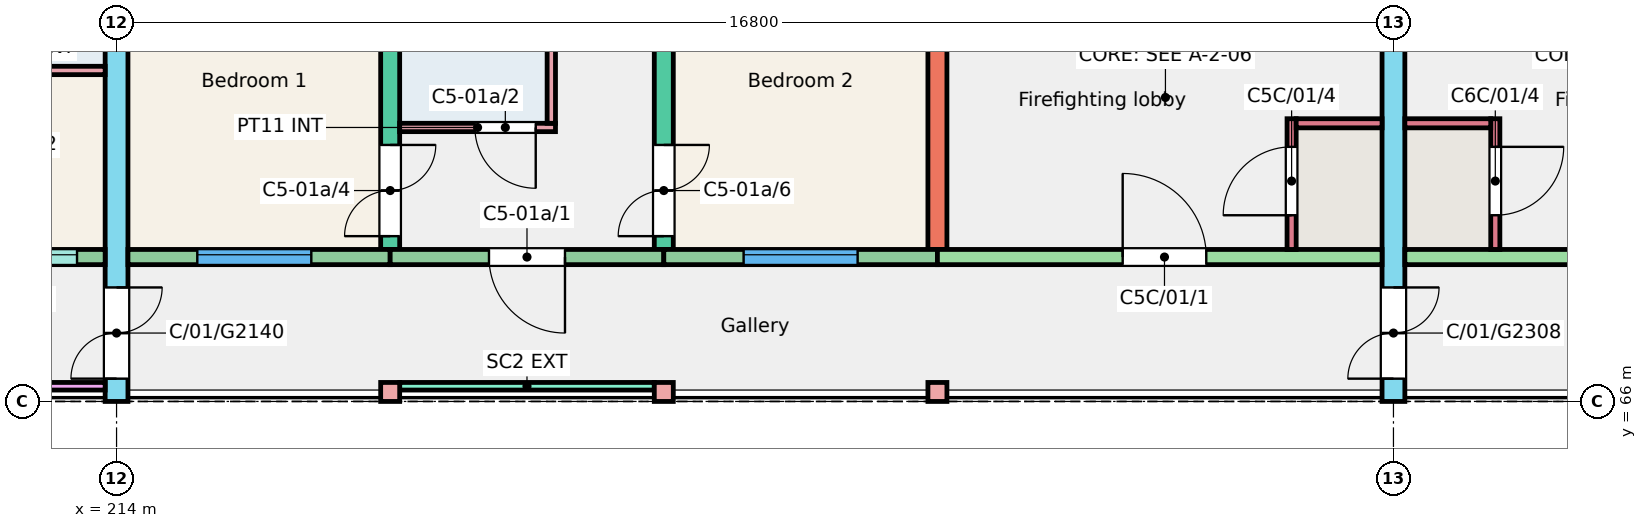
"""IFC4 building model, lengths in metres.
Left out: names, types, materials, properties, quantities, classifications, styles, units other than length and angle.
Written with IfcOpenShell. Run it as: python <this file> out.ifc"""

import sys

from ifc_helpers import new_model, si_unit, direction, frame, frame_2d, origin, origin_2d, place, context, subcontext, project, spatial, rectangle, extrude, element, fill, save


model = new_model("IFC4")
c1 = context("Model", 3, precision=1e-05, world=origin(), true_north=direction((0.0, 1.0)))
c2 = subcontext(c1, "Body", "Model", "MODEL_VIEW")
j1 = project(units=[si_unit("LENGTHUNIT", "METRE"), si_unit("PLANEANGLEUNIT", "RADIAN")], contexts=[c1])
p1 = place(None, origin())
s1 = spatial("IfcSite", under=j1, at=p1, CompositionType="ELEMENT")
p2 = place(p1, origin())
s2 = spatial("IfcBuilding", under=s1, at=p2, CompositionType="ELEMENT")
p3 = place(p2, frame((0.0, 0.0, 3.0)))
s3 = spatial("IfcBuildingStorey", under=s2, at=p3, CompositionType="ELEMENT", Elevation=3.0)
p4 = place(p3, frame((214.0, 66.0, 0.0), z_axis=(0.0, 0.0, 1.0), x_axis=(0.0, 1.0, 0.0)))
e1 = element("IfcWall", 1, at=p4, inside=s3, PredefinedType="SHEAR", context=c2, shape_type="SweptSolid", body=[
    extrude(rectangle(XDim=11.0, YDim=0.3, at=frame_2d((5.5, 0.0))), origin(), (0.0, 0.0, 1.0), 3.0),
])
p5 = place(p4, frame((0.3, 0.0, 0.0)))
e2 = element("IfcOpeningElement", 2, at=p5, cuts=e1, PredefinedType="OPENING", context=c2, shape_type="SweptSolid", body=[
    extrude(rectangle(XDim=1.2, YDim=2.1, at=frame_2d((0.6, 1.05))), frame((0.0, 0.16, 0.0), z_axis=(0.0, -1.0, 0.0), x_axis=(1.0, 0.0, 0.0)), (0.0, 0.0, 1.0), 0.32),
])
p6 = place(p3, frame((217.6, 68.0, 0.0), z_axis=(0.0, 0.0, 1.0), x_axis=(0.0, 1.0, 0.0)))
e3 = element("IfcWall", 3, at=p6, inside=s3, PredefinedType="SHEAR", context=c2, shape_type="SweptSolid", body=[
    extrude(rectangle(XDim=9.0, YDim=0.25, at=frame_2d((4.5, 0.0))), origin(), (0.0, 0.0, 1.0), 3.0),
])
p7 = place(p6, frame((0.175, 0.0, 0.0)))
e4 = element("IfcOpeningElement", 4, at=p7, cuts=e3, PredefinedType="OPENING", context=c2, shape_type="SweptSolid", body=[
    extrude(rectangle(XDim=1.2, YDim=2.1, at=frame_2d((0.6, 1.05))), frame((0.0, 0.135, 0.0), z_axis=(0.0, -1.0, 0.0), x_axis=(1.0, 0.0, 0.0)), (0.0, 0.0, 1.0), 0.27),
])
p8 = place(p6, frame((6.4, 0.0, 0.0)))
e5 = element("IfcOpeningElement", 5, at=p8, cuts=e3, PredefinedType="OPENING", context=c2, shape_type="SweptSolid", body=[
    extrude(rectangle(XDim=1.2, YDim=2.1, at=frame_2d((0.6, 1.05))), frame((0.0, 0.135, 0.0), z_axis=(0.0, -1.0, 0.0), x_axis=(1.0, 0.0, 0.0)), (0.0, 0.0, 1.0), 0.27),
])
p9 = place(p3, frame((221.2, 68.0, 0.0), z_axis=(0.0, 0.0, 1.0), x_axis=(0.0, 1.0, 0.0)))
e6 = element("IfcWall", 6, at=p9, inside=s3, PredefinedType="SHEAR", context=c2, shape_type="SweptSolid", body=[
    extrude(rectangle(XDim=9.0, YDim=0.25, at=frame_2d((4.5, 0.0))), origin(), (0.0, 0.0, 1.0), 3.0),
])
p10 = place(p9, frame((0.175, 0.0, 0.0)))
e7 = element("IfcOpeningElement", 7, at=p10, cuts=e6, PredefinedType="OPENING", context=c2, shape_type="SweptSolid", body=[
    extrude(rectangle(XDim=1.2, YDim=2.1, at=frame_2d((0.6, 1.05))), frame((0.0, 0.135, 0.0), z_axis=(0.0, -1.0, 0.0), x_axis=(1.0, 0.0, 0.0)), (0.0, 0.0, 1.0), 0.27),
])
p11 = place(p9, frame((6.4, 0.0, 0.0)))
e8 = element("IfcOpeningElement", 8, at=p11, cuts=e6, PredefinedType="OPENING", context=c2, shape_type="SweptSolid", body=[
    extrude(rectangle(XDim=1.2, YDim=2.1, at=frame_2d((0.6, 1.05))), frame((0.0, 0.135, 0.0), z_axis=(0.0, -1.0, 0.0), x_axis=(1.0, 0.0, 0.0)), (0.0, 0.0, 1.0), 0.27),
])
p12 = place(p3, frame((224.8, 68.0, 0.0), z_axis=(0.0, 0.0, 1.0), x_axis=(0.0, 1.0, 0.0)))
e9 = element("IfcWall", 9, at=p12, inside=s3, PredefinedType="SHEAR", context=c2, shape_type="SweptSolid", body=[
    extrude(rectangle(XDim=9.0, YDim=0.25, at=frame_2d((4.5, 0.0))), origin(), (0.0, 0.0, 1.0), 3.0),
])
p13 = place(p3, frame((230.8, 66.0, 0.0), z_axis=(0.0, 0.0, 1.0), x_axis=(0.0, 1.0, 0.0)))
e10 = element("IfcWall", 10, at=p13, inside=s3, PredefinedType="SHEAR", context=c2, shape_type="SweptSolid", body=[
    extrude(rectangle(XDim=11.0, YDim=0.3, at=frame_2d((5.5, 0.0))), origin(), (0.0, 0.0, 1.0), 3.0),
])
p14 = place(p13, frame((0.3, 0.0, 0.0)))
e11 = element("IfcOpeningElement", 11, at=p14, cuts=e10, PredefinedType="OPENING", context=c2, shape_type="SweptSolid", body=[
    extrude(rectangle(XDim=1.2, YDim=2.1, at=frame_2d((0.6, 1.05))), frame((0.0, 0.16, 0.0), z_axis=(0.0, -1.0, 0.0), x_axis=(1.0, 0.0, 0.0)), (0.0, 0.0, 1.0), 0.32),
])
p15 = place(p3, frame((210.4, 67.9, 0.0), z_axis=(0.0, 0.0, 1.0), x_axis=(1.0, 0.0, 0.0)))
e12 = element("IfcWall", 12, at=p15, inside=s3, PredefinedType="SOLIDWALL", context=c2, shape_type="SweptSolid", body=[
    extrude(rectangle(XDim=3.45, YDim=0.2, at=frame_2d((1.725, 0.0))), origin(), (0.0, 0.0, 1.0), 3.0),
])
p16 = place(p15, frame((1.88, 0.0, 1.1)))
e13 = element("IfcOpeningElement", 13, at=p16, cuts=e12, PredefinedType="OPENING", context=c2, shape_type="SweptSolid", body=[
    extrude(rectangle(XDim=1.2, YDim=1.3, at=frame_2d((0.6, 0.65))), frame((0.0, 0.11, 0.0), z_axis=(0.0, -1.0, 0.0), x_axis=(1.0, 0.0, 0.0)), (0.0, 0.0, 1.0), 0.22),
])
p17 = place(p15, frame((0.25, 0.0, 0.0)))
e14 = element("IfcOpeningElement", 14, at=p17, cuts=e12, PredefinedType="OPENING", context=c2, shape_type="SweptSolid", body=[
    extrude(rectangle(XDim=1.0, YDim=2.1, at=frame_2d((0.5, 1.05))), frame((0.0, 0.11, 0.0), z_axis=(0.0, -1.0, 0.0), x_axis=(1.0, 0.0, 0.0)), (0.0, 0.0, 1.0), 0.22),
])
p18 = place(p3, frame((214.15, 67.9, 0.0), z_axis=(0.0, 0.0, 1.0), x_axis=(1.0, 0.0, 0.0)))
e15 = element("IfcWall", 15, at=p18, inside=s3, PredefinedType="SOLIDWALL", context=c2, shape_type="SweptSolid", body=[
    extrude(rectangle(XDim=3.45, YDim=0.2, at=frame_2d((1.725, 0.0))), origin(), (0.0, 0.0, 1.0), 3.0),
])
p19 = place(p18, frame((0.913, 0.0, 0.9)))
e16 = element("IfcOpeningElement", 16, at=p19, cuts=e15, PredefinedType="OPENING", context=c2, shape_type="SweptSolid", body=[
    extrude(rectangle(XDim=1.5, YDim=1.5, at=frame_2d((0.75, 0.75))), frame((0.0, 0.11, 0.0), z_axis=(0.0, -1.0, 0.0), x_axis=(1.0, 0.0, 0.0)), (0.0, 0.0, 1.0), 0.22),
])
p20 = place(p3, frame((217.6, 67.9, 0.0), z_axis=(0.0, 0.0, 1.0), x_axis=(1.0, 0.0, 0.0)))
e17 = element("IfcWall", 17, at=p20, inside=s3, PredefinedType="SOLIDWALL", context=c2, shape_type="SweptSolid", body=[
    extrude(rectangle(XDim=3.6, YDim=0.2, at=frame_2d((1.8, 0.0))), origin(), (0.0, 0.0, 1.0), 3.0),
])
p21 = place(p20, frame((1.3, 0.0, 0.0)))
e18 = element("IfcOpeningElement", 18, at=p21, cuts=e17, PredefinedType="OPENING", context=c2, shape_type="SweptSolid", body=[
    extrude(rectangle(XDim=1.0, YDim=2.1, at=frame_2d((0.5, 1.05))), frame((0.0, 0.11, 0.0), z_axis=(0.0, -1.0, 0.0), x_axis=(1.0, 0.0, 0.0)), (0.0, 0.0, 1.0), 0.22),
])
p22 = place(p3, frame((221.2, 67.9, 0.0), z_axis=(0.0, 0.0, 1.0), x_axis=(1.0, 0.0, 0.0)))
e19 = element("IfcWall", 19, at=p22, inside=s3, PredefinedType="SOLIDWALL", context=c2, shape_type="SweptSolid", body=[
    extrude(rectangle(XDim=3.6, YDim=0.2, at=frame_2d((1.8, 0.0))), origin(), (0.0, 0.0, 1.0), 3.0),
])
p23 = place(p22, frame((1.05, 0.0, 0.9)))
e20 = element("IfcOpeningElement", 20, at=p23, cuts=e19, PredefinedType="OPENING", context=c2, shape_type="SweptSolid", body=[
    extrude(rectangle(XDim=1.5, YDim=1.5, at=frame_2d((0.75, 0.75))), frame((0.0, 0.11, 0.0), z_axis=(0.0, -1.0, 0.0), x_axis=(1.0, 0.0, 0.0)), (0.0, 0.0, 1.0), 0.22),
])
p24 = place(p3, frame((224.8, 67.9, 0.0), z_axis=(0.0, 0.0, 1.0), x_axis=(1.0, 0.0, 0.0)))
e21 = element("IfcWall", 21, at=p24, inside=s3, PredefinedType="SHEAR", context=c2, shape_type="SweptSolid", body=[
    extrude(rectangle(XDim=5.85, YDim=0.2, at=frame_2d((2.925, 0.0))), origin(), (0.0, 0.0, 1.0), 3.0),
])
p25 = place(p24, frame((2.438, 0.0, 0.0)))
e22 = element("IfcOpeningElement", 22, at=p25, cuts=e21, PredefinedType="OPENING", context=c2, shape_type="SweptSolid", body=[
    extrude(rectangle(XDim=1.1, YDim=2.1, at=frame_2d((0.55, 1.05))), frame((0.0, 0.11, 0.0), z_axis=(0.0, -1.0, 0.0), x_axis=(1.0, 0.0, 0.0)), (0.0, 0.0, 1.0), 0.22),
])
p26 = place(p3, frame((229.46, 68.0, 0.0), z_axis=(0.0, 0.0, 1.0), x_axis=(0.0, 1.0, 0.0)))
e23 = element("IfcWall", 23, at=p26, inside=s3, PredefinedType="SHEAR", context=c2, shape_type="SweptSolid", body=[
    extrude(rectangle(XDim=1.72, YDim=0.12, at=frame_2d((0.86, 0.0))), origin(), (0.0, 0.0, 1.0), 3.0),
])
p27 = place(p26, frame((0.45, 0.0, 0.0)))
e24 = element("IfcOpeningElement", 24, at=p27, cuts=e23, PredefinedType="OPENING", context=c2, shape_type="SweptSolid", body=[
    extrude(rectangle(XDim=0.9, YDim=2.1, at=frame_2d((0.45, 1.05))), frame((0.0, 0.07, 0.0), z_axis=(0.0, -1.0, 0.0), x_axis=(1.0, 0.0, 0.0)), (0.0, 0.0, 1.0), 0.14),
])
p28 = place(p3, frame((229.52, 69.66, 0.0), z_axis=(0.0, 0.0, 1.0), x_axis=(1.0, 0.0, 0.0)))
e25 = element("IfcWall", 25, at=p28, inside=s3, PredefinedType="SHEAR", context=c2, shape_type="SweptSolid", body=[
    extrude(rectangle(XDim=1.13, YDim=0.12, at=frame_2d((0.565, 0.0))), origin(), (0.0, 0.0, 1.0), 3.0),
])
p29 = place(p3, frame((230.95, 67.9, 0.0), z_axis=(0.0, 0.0, 1.0), x_axis=(1.0, 0.0, 0.0)))
e26 = element("IfcWall", 26, at=p29, inside=s3, PredefinedType="SHEAR", context=c2, shape_type="SweptSolid", body=[
    extrude(rectangle(XDim=5.85, YDim=0.2, at=frame_2d((2.925, 0.0))), origin(), (0.0, 0.0, 1.0), 3.0),
])
p30 = place(p29, frame((2.312, 0.0, 0.0)))
e27 = element("IfcOpeningElement", 27, at=p30, cuts=e26, PredefinedType="OPENING", context=c2, shape_type="SweptSolid", body=[
    extrude(rectangle(XDim=1.1, YDim=2.1, at=frame_2d((0.55, 1.05))), frame((0.0, 0.11, 0.0), z_axis=(0.0, -1.0, 0.0), x_axis=(1.0, 0.0, 0.0)), (0.0, 0.0, 1.0), 0.22),
])
p31 = place(p3, frame((232.14, 68.0, 0.0), z_axis=(0.0, 0.0, 1.0), x_axis=(0.0, 1.0, 0.0)))
e28 = element("IfcWall", 28, at=p31, inside=s3, PredefinedType="SHEAR", context=c2, shape_type="SweptSolid", body=[
    extrude(rectangle(XDim=1.72, YDim=0.12, at=frame_2d((0.86, 0.0))), origin(), (0.0, 0.0, 1.0), 3.0),
])
p32 = place(p31, frame((0.45, 0.0, 0.0)))
e29 = element("IfcOpeningElement", 29, at=p32, cuts=e28, PredefinedType="OPENING", context=c2, shape_type="SweptSolid", body=[
    extrude(rectangle(XDim=0.9, YDim=2.1, at=frame_2d((0.45, 1.05))), frame((0.0, 0.07, 0.0), z_axis=(0.0, -1.0, 0.0), x_axis=(1.0, 0.0, 0.0)), (0.0, 0.0, 1.0), 0.14),
])
p33 = place(p3, frame((230.95, 69.66, 0.0), z_axis=(0.0, 0.0, 1.0), x_axis=(1.0, 0.0, 0.0)))
e30 = element("IfcWall", 30, at=p33, inside=s3, PredefinedType="SHEAR", context=c2, shape_type="SweptSolid", body=[
    extrude(rectangle(XDim=1.13, YDim=0.12, at=frame_2d((0.565, 0.0))), origin(), (0.0, 0.0, 1.0), 3.0),
])
for number, where, z_axis, x_axis in (
    (31, (217.6, 66.125, 0.0), (0.0, 0.0, 1.0), (1.0, 0.0, 0.0)),
    (32, (221.2, 66.125, 0.0), (0.0, 0.0, 1.0), (1.0, 0.0, 0.0)),
    (33, (224.8, 66.125, 0.0), (0.0, 0.0, 1.0), (1.0, 0.0, 0.0)),
):
    element("IfcColumn", number, at=place(p3, frame(where, z_axis=z_axis, x_axis=x_axis)), inside=s3, PredefinedType="COLUMN", context=c2, shape_type="SweptSolid", body=[
        extrude(rectangle(XDim=0.25, YDim=0.25, at=origin_2d()), origin(), (0.0, 0.0, 1.0), 3.0),
    ])
p34 = place(p3, frame((210.525, 66.2, 0.0), z_axis=(0.0, 0.0, 1.0), x_axis=(1.0, 0.0, 0.0)))
e34 = element("IfcWall", 34, at=p34, inside=s3, PredefinedType="SOLIDWALL", context=c2, shape_type="SweptSolid", body=[
    extrude(rectangle(XDim=3.325, YDim=0.1, at=frame_2d((1.663, 0.0))), origin(), (0.0, 0.0, 1.0), 2.45),
])
p35 = place(p3, frame((217.725, 66.2, 0.0), z_axis=(0.0, 0.0, 1.0), x_axis=(1.0, 0.0, 0.0)))
e35 = element("IfcWall", 35, at=p35, inside=s3, PredefinedType="SOLIDWALL", context=c2, shape_type="SweptSolid", body=[
    extrude(rectangle(XDim=3.35, YDim=0.1, at=frame_2d((1.675, 0.0))), origin(), (0.0, 0.0, 1.0), 2.45),
])
p36 = place(p3, frame((211.91, 70.355, 0.0), z_axis=(0.0, 0.0, 1.0), x_axis=(1.0, 0.0, 0.0)))
e36 = element("IfcWall", 36, at=p36, inside=s3, PredefinedType="PARTITIONING", context=c2, shape_type="SweptSolid", body=[
    extrude(rectangle(XDim=1.94, YDim=0.11, at=frame_2d((0.97, 0.0))), origin(), (0.0, 0.0, 1.0), 2.8),
])
p37 = place(p3, frame((217.725, 69.605, 0.0), z_axis=(0.0, 0.0, 1.0), x_axis=(1.0, 0.0, 0.0)))
e37 = element("IfcWall", 37, at=p37, inside=s3, PredefinedType="PARTITIONING", context=c2, shape_type="SweptSolid", body=[
    extrude(rectangle(XDim=2.05, YDim=0.11, at=frame_2d((1.025, 0.0))), origin(), (0.0, 0.0, 1.0), 2.8),
])
p38 = place(p37, frame((0.99, 0.0, 0.0)))
e38 = element("IfcOpeningElement", 38, at=p38, cuts=e37, PredefinedType="OPENING", context=c2, shape_type="SweptSolid", body=[
    extrude(rectangle(XDim=0.8, YDim=2.1, at=frame_2d((0.4, 1.05))), frame((0.0, 0.065, 0.0), z_axis=(0.0, -1.0, 0.0), x_axis=(1.0, 0.0, 0.0)), (0.0, 0.0, 1.0), 0.13),
])
p39 = place(p3, frame((219.72, 69.66, 0.0), z_axis=(0.0, 0.0, 1.0), x_axis=(0.0, 1.0, 0.0)))
e39 = element("IfcWall", 39, at=p39, inside=s3, PredefinedType="PARTITIONING", context=c2, shape_type="SweptSolid", body=[
    extrude(rectangle(XDim=2.4, YDim=0.11, at=frame_2d((1.2, 0.0))), origin(), (0.0, 0.0, 1.0), 2.8),
])
p40 = place(p16, origin())
e40 = element("IfcWindow", 40, at=p40, inside=s3, PartitioningType="SINGLE_PANEL", PredefinedType="WINDOW", context=c2, shape_type="SweptSolid", body=[
    extrude(rectangle(XDim=1.2, YDim=1.3, at=frame_2d((0.6, 0.65))), frame((0.0, 0.06, 0.0), z_axis=(0.0, -1.0, 0.0), x_axis=(1.0, 0.0, 0.0)), (0.0, 0.0, 1.0), 0.06),
])
fill(e13, e40)
p41 = place(p19, origin())
e41 = element("IfcWindow", 41, at=p41, inside=s3, PartitioningType="SINGLE_PANEL", PredefinedType="WINDOW", context=c2, shape_type="SweptSolid", body=[
    extrude(rectangle(XDim=1.5, YDim=1.5, at=frame_2d((0.75, 0.75))), frame((0.0, 0.06, 0.0), z_axis=(0.0, -1.0, 0.0), x_axis=(1.0, 0.0, 0.0)), (0.0, 0.0, 1.0), 0.06),
])
fill(e16, e41)
p42 = place(p23, origin())
e42 = element("IfcWindow", 42, at=p42, inside=s3, PartitioningType="SINGLE_PANEL", PredefinedType="WINDOW", context=c2, shape_type="SweptSolid", body=[
    extrude(rectangle(XDim=1.5, YDim=1.5, at=frame_2d((0.75, 0.75))), frame((0.0, 0.06, 0.0), z_axis=(0.0, -1.0, 0.0), x_axis=(1.0, 0.0, 0.0)), (0.0, 0.0, 1.0), 0.06),
])
fill(e20, e42)
p43 = place(p21, origin())
e43 = element("IfcDoor", 43, at=p43, inside=s3, OperationType="SINGLE_SWING_RIGHT", PredefinedType="DOOR", context=c2, shape_type="SweptSolid", body=[
    extrude(rectangle(XDim=1.0, YDim=2.1, at=frame_2d((0.5, 1.05))), frame((0.0, 0.025, 0.0), z_axis=(0.0, -1.0, 0.0), x_axis=(1.0, 0.0, 0.0)), (0.0, 0.0, 1.0), 0.05),
])
fill(e18, e43)
p44 = place(p38, origin())
e44 = element("IfcDoor", 44, at=p44, inside=s3, OperationType="SINGLE_SWING_RIGHT", PredefinedType="DOOR", context=c2, shape_type="SweptSolid", body=[
    extrude(rectangle(XDim=0.8, YDim=2.1, at=frame_2d((0.4, 1.05))), frame((0.0, 0.025, 0.0), z_axis=(0.0, -1.0, 0.0), x_axis=(1.0, 0.0, 0.0)), (0.0, 0.0, 1.0), 0.05),
])
fill(e38, e44)
p45 = place(p7, origin())
e45 = element("IfcDoor", 45, at=p45, inside=s3, OperationType="DOUBLE_DOOR_SINGLE_SWING", PredefinedType="DOOR", context=c2, shape_type="SweptSolid", body=[
    extrude(rectangle(XDim=1.2, YDim=2.1, at=frame_2d((0.6, 1.05))), frame((0.0, 0.025, 0.0), z_axis=(0.0, -1.0, 0.0), x_axis=(1.0, 0.0, 0.0)), (0.0, 0.0, 1.0), 0.05),
])
fill(e4, e45)
p46 = place(p10, origin())
e46 = element("IfcDoor", 46, at=p46, inside=s3, OperationType="DOUBLE_DOOR_SINGLE_SWING", PredefinedType="DOOR", context=c2, shape_type="SweptSolid", body=[
    extrude(rectangle(XDim=1.2, YDim=2.1, at=frame_2d((0.6, 1.05))), frame((0.0, 0.025, 0.0), z_axis=(0.0, -1.0, 0.0), x_axis=(1.0, 0.0, 0.0)), (0.0, 0.0, 1.0), 0.05),
])
fill(e7, e46)
p47 = place(p25, origin())
e47 = element("IfcDoor", 47, at=p47, inside=s3, OperationType="SINGLE_SWING_LEFT", PredefinedType="DOOR", context=c2, shape_type="SweptSolid", body=[
    extrude(rectangle(XDim=1.1, YDim=2.1, at=frame_2d((0.55, 1.05))), frame((0.0, 0.025, 0.0), z_axis=(0.0, -1.0, 0.0), x_axis=(1.0, 0.0, 0.0)), (0.0, 0.0, 1.0), 0.05),
])
fill(e22, e47)
p48 = place(p27, origin())
e48 = element("IfcDoor", 48, at=p48, inside=s3, OperationType="SINGLE_SWING_LEFT", PredefinedType="DOOR", context=c2, shape_type="SweptSolid", body=[
    extrude(rectangle(XDim=0.9, YDim=2.1, at=frame_2d((0.45, 1.05))), frame((0.0, 0.025, 0.0), z_axis=(0.0, -1.0, 0.0), x_axis=(1.0, 0.0, 0.0)), (0.0, 0.0, 1.0), 0.05),
])
fill(e24, e48)
p49 = place(p32, origin())
e49 = element("IfcDoor", 49, at=p49, inside=s3, OperationType="SINGLE_SWING_RIGHT", PredefinedType="DOOR", context=c2, shape_type="SweptSolid", body=[
    extrude(rectangle(XDim=0.9, YDim=2.1, at=frame_2d((0.45, 1.05))), frame((0.0, 0.025, 0.0), z_axis=(0.0, -1.0, 0.0), x_axis=(1.0, 0.0, 0.0)), (0.0, 0.0, 1.0), 0.05),
])
fill(e29, e49)
p50 = place(p5, origin())
e50 = element("IfcDoor", 50, at=p50, inside=s3, OperationType="DOUBLE_DOOR_SINGLE_SWING", PredefinedType="DOOR", context=c2, shape_type="SweptSolid", body=[
    extrude(rectangle(XDim=1.2, YDim=2.1, at=frame_2d((0.6, 1.05))), frame((0.0, 0.025, 0.0), z_axis=(0.0, -1.0, 0.0), x_axis=(1.0, 0.0, 0.0)), (0.0, 0.0, 1.0), 0.05),
])
fill(e2, e50)
p51 = place(p14, origin())
e51 = element("IfcDoor", 51, at=p51, inside=s3, OperationType="DOUBLE_DOOR_SINGLE_SWING", PredefinedType="DOOR", context=c2, shape_type="SweptSolid", body=[
    extrude(rectangle(XDim=1.2, YDim=2.1, at=frame_2d((0.6, 1.05))), frame((0.0, 0.025, 0.0), z_axis=(0.0, -1.0, 0.0), x_axis=(1.0, 0.0, 0.0)), (0.0, 0.0, 1.0), 0.05),
])
fill(e11, e51)
save(model, sys.argv[1])
